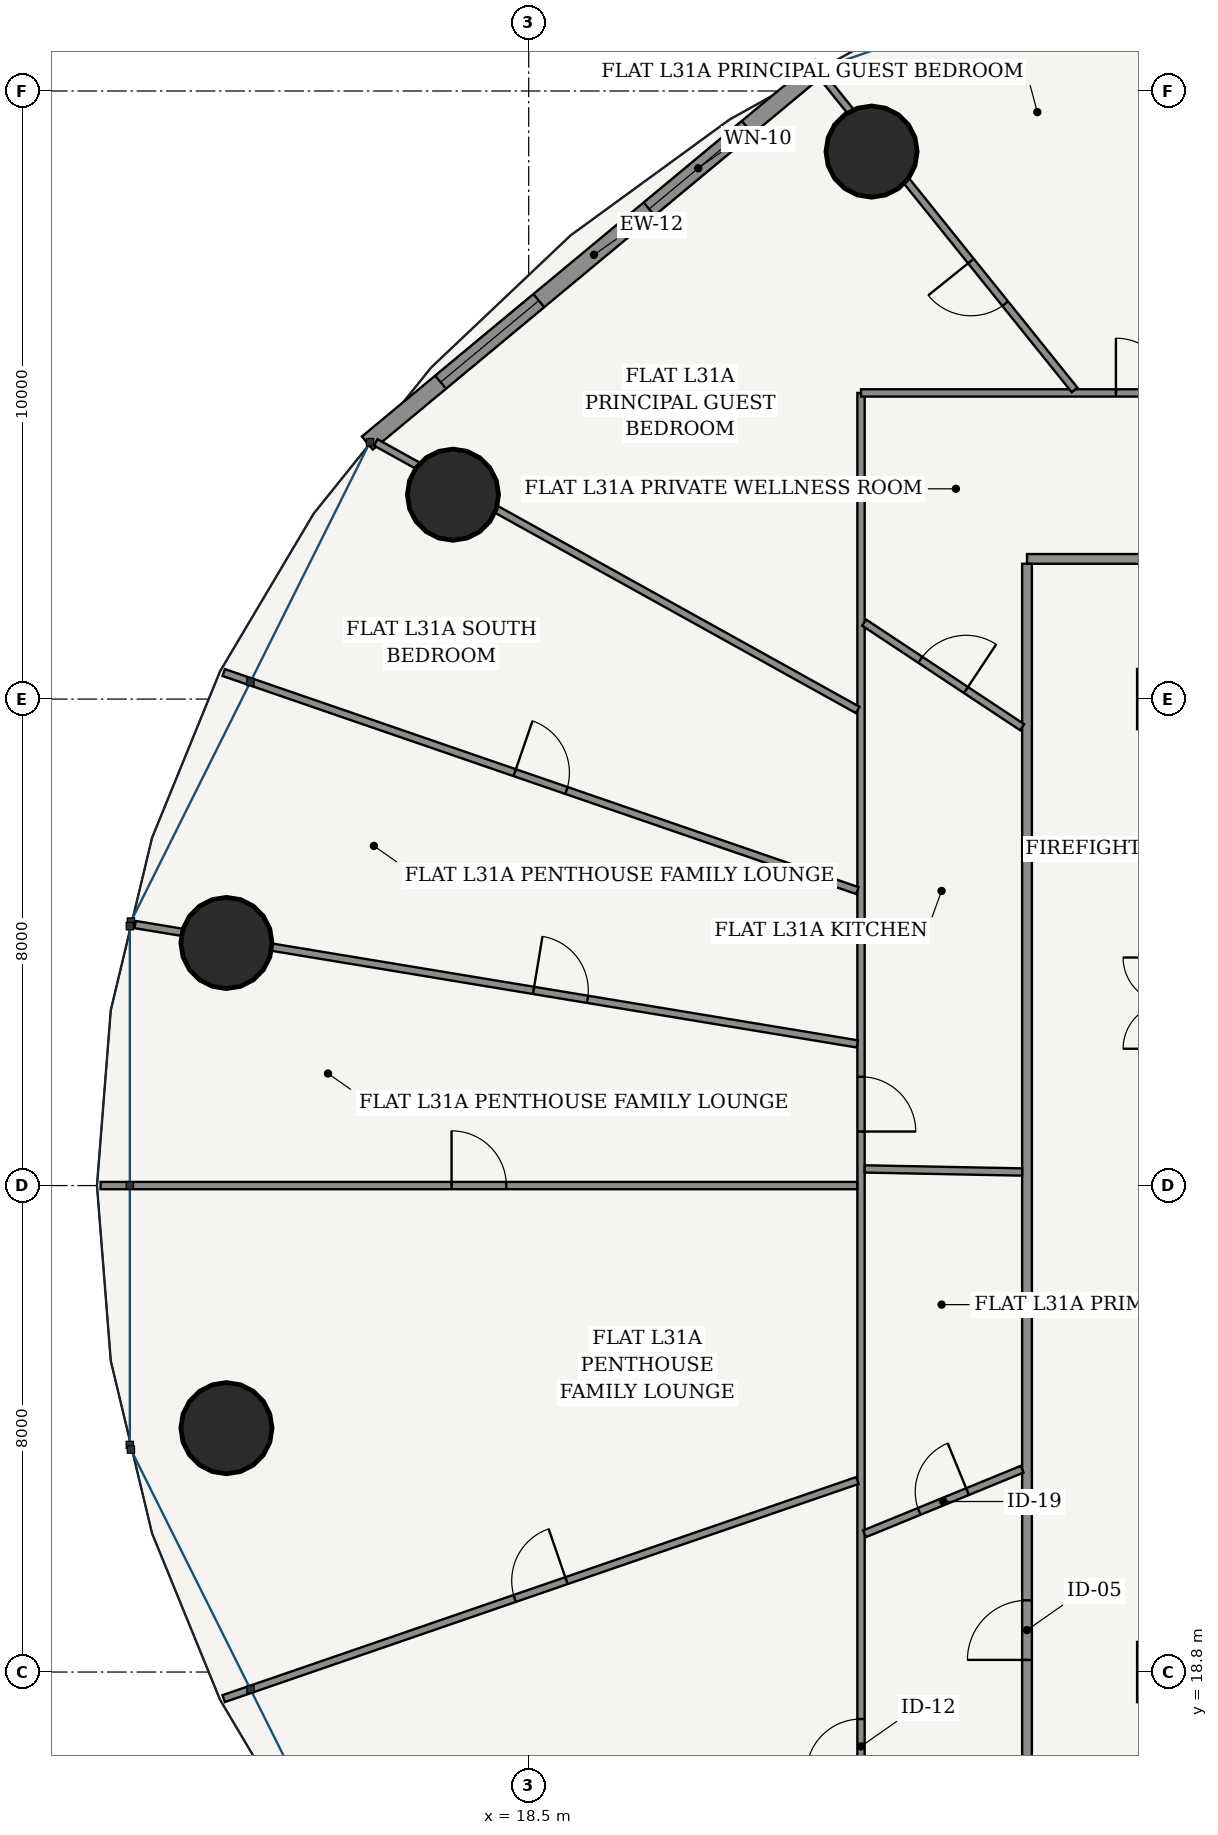
"""IFC4 building model, lengths in metres.
Left out: names, types, materials, properties, quantities, classifications, styles, units other than length and angle.
Written with IfcOpenShell. Run it as: python <this file> out.ifc"""

import sys

from ifc_helpers import new_model, si_unit, direction, frame, frame_2d, origin, origin_2d, place, context, subcontext, project, spatial, rectangle, hollow_circle, extrude, source, transform, mapped, element, fill, save


model = new_model("IFC4")
c1 = context("Model", 3, precision=1e-05, world=origin(), true_north=direction((-0.2419218956, 0.970295726276)))
c2 = subcontext(c1, "Body", "Model", "MODEL_VIEW")
j1 = project(units=[si_unit("LENGTHUNIT", "METRE"), si_unit("PLANEANGLEUNIT", "RADIAN")], contexts=[c1])
p1 = place(None, origin())
s1 = spatial("IfcSite", under=j1, at=p1, CompositionType="ELEMENT")
p2 = place(p1, origin())
s2 = spatial("IfcBuilding", under=s1, at=p2, CompositionType="ELEMENT")
p3 = place(p2, frame((0.0, 0.0, 119.4)))
s3 = spatial("IfcBuildingStorey", under=s2, at=p3, CompositionType="ELEMENT", Elevation=119.4)
for number, where, z_axis, x_axis in (
    (1, (24.138, 43.803, 0.0), (0.0, 0.0, 1.0), (1.0, 0.0, 0.0)),
    (2, (17.255, 38.161, 0.0), (0.0, 0.0, 1.0), (1.0, 0.0, 0.0)),
    (3, (13.529, 30.79, 0.0), (0.0, 0.0, 1.0), (1.0, 0.0, 0.0)),
    (4, (13.529, 22.81, 0.0), (0.0, 0.0, 1.0), (1.0, 0.0, 0.0)),
):
    element("IfcColumn", number, at=place(p3, frame(where, z_axis=z_axis, x_axis=x_axis)), inside=s3, PredefinedType="COLUMN", context=c2, shape_type="SweptSolid", body=[
        extrude(hollow_circle(Radius=0.75, WallThickness=0.045, at=origin_2d()), origin(), (0.0, 0.0, 1.0), 3.6),
    ])
p4 = place(p3, frame((23.3, 45.202, 0.0), z_axis=(0.0, 0.0, 1.0), x_axis=(-0.769242574941, -0.638956853706, 0.0)))
e5 = element("IfcWall", 5, at=p4, inside=s3, PredefinedType="SOLIDWALL", context=c2, shape_type="SweptSolid", body=[
    extrude(rectangle(XDim=9.69, YDim=0.28, at=frame_2d((4.845, 0.0))), origin(), (0.0, 0.0, 1.0), 3.325),
])
p5 = place(p4, frame((1.566, 0.0, 0.85)))
e6 = element("IfcOpeningElement", 6, at=p5, cuts=e5, PredefinedType="OPENING", context=c2, shape_type="SweptSolid", body=[
    extrude(rectangle(XDim=2.1, YDim=1.95, at=frame_2d((1.05, 0.975))), frame((0.0, 0.15, 0.0), z_axis=(0.0, -1.0, 0.0), x_axis=(1.0, 0.0, 0.0)), (0.0, 0.0, 1.0), 0.3),
])
p6 = place(p4, frame((6.023, 0.0, 0.85)))
e7 = element("IfcOpeningElement", 7, at=p6, cuts=e5, PredefinedType="OPENING", context=c2, shape_type="SweptSolid", body=[
    extrude(rectangle(XDim=2.1, YDim=1.95, at=frame_2d((1.05, 0.975))), frame((0.0, 0.15, 0.0), z_axis=(0.0, -1.0, 0.0), x_axis=(1.0, 0.0, 0.0)), (0.0, 0.0, 1.0), 0.3),
])
p7 = place(p3, frame((26.695, 37.105, 0.0), z_axis=(0.0, 0.0, 1.0), x_axis=(1.0, 0.0, 0.0)))
e8 = element("IfcWall", 8, at=p7, inside=s3, PredefinedType="PARTITIONING", context=c2, shape_type="SweptSolid", body=[
    extrude(rectangle(XDim=22.61, YDim=0.16, at=frame_2d((11.305, 0.0))), origin(), (0.0, 0.0, 1.0), 2.767),
])
p8 = place(p3, frame((26.695, 16.575, 0.0), z_axis=(0.0, 0.0, 1.0), x_axis=(0.0, 1.0, 0.0)))
e9 = element("IfcWall", 9, at=p8, inside=s3, PredefinedType="PARTITIONING", context=c2, shape_type="SweptSolid", body=[
    extrude(rectangle(XDim=20.45, YDim=0.16, at=frame_2d((10.225, 0.0))), origin(), (0.0, 0.0, 1.0), 2.767),
])
p9 = place(p8, frame((2.424, 0.0, 0.0)))
e10 = element("IfcOpeningElement", 10, at=p9, cuts=e9, PredefinedType="OPENING", context=c2, shape_type="SweptSolid", body=[
    extrude(rectangle(XDim=0.98, YDim=2.2, at=frame_2d((0.49, 1.1))), frame((0.0, 0.09, 0.0), z_axis=(0.0, -1.0, 0.0), x_axis=(1.0, 0.0, 0.0)), (0.0, 0.0, 1.0), 0.18),
])
p10 = place(p3, frame((23.965, 13.765, 0.0), z_axis=(0.0, 0.0, 1.0), x_axis=(0.0, 1.0, 0.0)))
e11 = element("IfcWall", 11, at=p10, inside=s3, PredefinedType="PARTITIONING", context=c2, shape_type="SweptSolid", body=[
    extrude(rectangle(XDim=26.07, YDim=0.12, at=frame_2d((13.035, 0.0))), origin(), (0.0, 0.0, 1.0), 2.767),
])
p11 = place(p10, frame((3.362, 0.0, 0.0)))
e12 = element("IfcOpeningElement", 12, at=p11, cuts=e11, PredefinedType="OPENING", context=c2, shape_type="SweptSolid", body=[
    extrude(rectangle(XDim=0.9, YDim=2.15, at=frame_2d((0.45, 1.075))), frame((0.0, 0.07, 0.0), z_axis=(0.0, -1.0, 0.0), x_axis=(1.0, 0.0, 0.0)), (0.0, 0.0, 1.0), 0.14),
])
p12 = place(p10, frame((13.924, 0.0, 0.0)))
e13 = element("IfcOpeningElement", 13, at=p12, cuts=e11, PredefinedType="OPENING", context=c2, shape_type="SweptSolid", body=[
    extrude(rectangle(XDim=0.9, YDim=2.15, at=frame_2d((0.45, 1.075))), frame((0.0, 0.07, 0.0), z_axis=(0.0, -1.0, 0.0), x_axis=(1.0, 0.0, 0.0)), (0.0, 0.0, 1.0), 0.14),
])
p13 = place(p3, frame((23.965, 39.835, 0.0), z_axis=(0.0, 0.0, 1.0), x_axis=(1.0, 0.0, 0.0)))
e14 = element("IfcWall", 14, at=p13, inside=s3, PredefinedType="PARTITIONING", context=c2, shape_type="SweptSolid", body=[
    extrude(rectangle(XDim=24.416, YDim=0.12, at=frame_2d((12.208, 0.0))), origin(), (0.0, 0.0, 1.0), 2.767),
])
p14 = place(p13, frame((4.192, 0.0, 0.0)))
e15 = element("IfcOpeningElement", 15, at=p14, cuts=e14, PredefinedType="OPENING", context=c2, shape_type="SweptSolid", body=[
    extrude(rectangle(XDim=0.9, YDim=2.15, at=frame_2d((0.45, 1.075))), frame((0.0, 0.07, 0.0), z_axis=(0.0, -1.0, 0.0), x_axis=(1.0, 0.0, 0.0)), (0.0, 0.0, 1.0), 0.14),
])
p15 = place(p13, frame((19.728, 0.0, 0.0)))
e16 = element("IfcOpeningElement", 16, at=p15, cuts=e14, PredefinedType="OPENING", context=c2, shape_type="SweptSolid", body=[
    extrude(rectangle(XDim=0.86, YDim=2.15, at=frame_2d((0.43, 1.075))), frame((0.0, 0.07, 0.0), z_axis=(0.0, -1.0, 0.0), x_axis=(1.0, 0.0, 0.0)), (0.0, 0.0, 1.0), 0.14),
])
p16 = place(p3, frame((31.474, 39.89, 0.0), z_axis=(0.0, 0.0, 1.0), x_axis=(-0.446167584581, 0.894949432353, 0.0)))
e17 = element("IfcWall", 17, at=p16, inside=s3, PredefinedType="PARTITIONING", context=c2, shape_type="SweptSolid", body=[
    extrude(rectangle(XDim=8.125, YDim=0.12, at=frame_2d((4.062, 0.0))), origin(), (0.0, 0.0, 1.0), 2.767),
])
p17 = place(p16, frame((3.612, 0.0, 0.0)))
e18 = element("IfcOpeningElement", 18, at=p17, cuts=e17, PredefinedType="OPENING", context=c2, shape_type="SweptSolid", body=[
    extrude(rectangle(XDim=0.9, YDim=2.15, at=frame_2d((0.45, 1.075))), frame((0.0, 0.07, 0.0), z_axis=(0.0, -1.0, 0.0), x_axis=(1.0, 0.0, 0.0)), (0.0, 0.0, 1.0), 0.14),
])
p18 = place(p3, frame((27.478, 39.883, 0.0), z_axis=(0.0, 0.0, 1.0), x_axis=(-0.62672583251, 0.779239841682, 0.0)))
e19 = element("IfcWall", 19, at=p18, inside=s3, PredefinedType="PARTITIONING", context=c2, shape_type="SweptSolid", body=[
    extrude(rectangle(XDim=6.678, YDim=0.12, at=frame_2d((3.339, 0.0))), origin(), (0.0, 0.0, 1.0), 2.767),
])
p19 = place(p18, frame((1.821, 0.0, 0.0)))
e20 = element("IfcOpeningElement", 20, at=p19, cuts=e19, PredefinedType="OPENING", context=c2, shape_type="SweptSolid", body=[
    extrude(rectangle(XDim=0.9, YDim=2.15, at=frame_2d((0.45, 1.075))), frame((0.0, 0.07, 0.0), z_axis=(0.0, -1.0, 0.0), x_axis=(1.0, 0.0, 0.0)), (0.0, 0.0, 1.0), 0.14),
])
p20 = place(p3, frame((23.911, 34.622, 0.0), z_axis=(0.0, 0.0, 1.0), x_axis=(-0.874324904351, 0.485341077626, 0.0)))
e21 = element("IfcWall", 21, at=p20, inside=s3, PredefinedType="PARTITIONING", context=c2, shape_type="SweptSolid", body=[
    extrude(rectangle(XDim=9.066, YDim=0.12, at=frame_2d((4.533, 0.0))), origin(), (0.0, 0.0, 1.0), 2.767),
])
p21 = place(p3, frame((23.906, 31.65, 0.0), z_axis=(0.0, 0.0, 1.0), x_axis=(-0.945573120726, 0.32540970078, 0.0)))
e22 = element("IfcWall", 22, at=p21, inside=s3, PredefinedType="PARTITIONING", context=c2, shape_type="SweptSolid", body=[
    extrude(rectangle(XDim=11.022, YDim=0.12, at=frame_2d((5.511, 0.0))), origin(), (0.0, 0.0, 1.0), 2.767),
])
p22 = place(p21, frame((5.061, 0.0, 0.0)))
e23 = element("IfcOpeningElement", 23, at=p22, cuts=e22, PredefinedType="OPENING", context=c2, shape_type="SweptSolid", body=[
    extrude(rectangle(XDim=0.9, YDim=2.15, at=frame_2d((0.45, 1.075))), frame((0.0, 0.07, 0.0), z_axis=(0.0, -1.0, 0.0), x_axis=(1.0, 0.0, 0.0)), (0.0, 0.0, 1.0), 0.14),
])
p23 = place(p3, frame((23.904, 29.13, 0.0), z_axis=(0.0, 0.0, 1.0), x_axis=(-0.986618264768, 0.163047231274, 0.0)))
e24 = element("IfcWall", 24, at=p23, inside=s3, PredefinedType="PARTITIONING", context=c2, shape_type="SweptSolid", body=[
    extrude(rectangle(XDim=12.039, YDim=0.12, at=frame_2d((6.02, 0.0))), origin(), (0.0, 0.0, 1.0), 2.767),
])
p24 = place(p23, frame((4.496, 0.0, 0.0)))
e25 = element("IfcOpeningElement", 25, at=p24, cuts=e24, PredefinedType="OPENING", context=c2, shape_type="SweptSolid", body=[
    extrude(rectangle(XDim=0.9, YDim=2.15, at=frame_2d((0.45, 1.075))), frame((0.0, 0.07, 0.0), z_axis=(0.0, -1.0, 0.0), x_axis=(1.0, 0.0, 0.0)), (0.0, 0.0, 1.0), 0.14),
])
p25 = place(p3, frame((23.903, 26.8, 0.0), z_axis=(0.0, 0.0, 1.0), x_axis=(-1.0, 0.0, 0.0)))
e26 = element("IfcWall", 26, at=p25, inside=s3, PredefinedType="PARTITIONING", context=c2, shape_type="SweptSolid", body=[
    extrude(rectangle(XDim=12.443, YDim=0.12, at=frame_2d((6.222, 0.0))), origin(), (0.0, 0.0, 1.0), 2.767),
])
p26 = place(p25, frame((5.771, 0.0, 0.0)))
e27 = element("IfcOpeningElement", 27, at=p26, cuts=e26, PredefinedType="OPENING", context=c2, shape_type="SweptSolid", body=[
    extrude(rectangle(XDim=0.9, YDim=2.15, at=frame_2d((0.45, 1.075))), frame((0.0, 0.07, 0.0), z_axis=(0.0, -1.0, 0.0), x_axis=(1.0, 0.0, 0.0)), (0.0, 0.0, 1.0), 0.14),
])
p27 = place(p3, frame((23.906, 21.95, 0.0), z_axis=(0.0, 0.0, 1.0), x_axis=(-0.945573120726, -0.32540970078, 0.0)))
e28 = element("IfcWall", 28, at=p27, inside=s3, PredefinedType="PARTITIONING", context=c2, shape_type="SweptSolid", body=[
    extrude(rectangle(XDim=11.022, YDim=0.12, at=frame_2d((5.511, 0.0))), origin(), (0.0, 0.0, 1.0), 2.767),
])
p28 = place(p27, frame((5.061, 0.0, 0.0)))
e29 = element("IfcOpeningElement", 29, at=p28, cuts=e28, PredefinedType="OPENING", context=c2, shape_type="SweptSolid", body=[
    extrude(rectangle(XDim=0.9, YDim=2.15, at=frame_2d((0.45, 1.075))), frame((0.0, 0.07, 0.0), z_axis=(0.0, -1.0, 0.0), x_axis=(1.0, 0.0, 0.0)), (0.0, 0.0, 1.0), 0.14),
])
p29 = place(p3, frame((26.615, 34.337, 0.0), z_axis=(0.0, 0.0, 1.0), x_axis=(-0.833829855758, 0.552021531868, 0.0)))
e30 = element("IfcWall", 30, at=p29, inside=s3, PredefinedType="PARTITIONING", context=c2, shape_type="SweptSolid", body=[
    extrude(rectangle(XDim=3.116, YDim=0.12, at=frame_2d((1.558, 0.0))), origin(), (0.0, 0.0, 1.0), 3.325),
])
p30 = place(p29, frame((1.108, 0.0, 0.0)))
e31 = element("IfcOpeningElement", 31, at=p30, cuts=e30, PredefinedType="OPENING", context=c2, shape_type="SweptSolid", body=[
    extrude(rectangle(XDim=0.9, YDim=2.15, at=frame_2d((0.45, 1.075))), frame((0.0, 0.07, 0.0), z_axis=(0.0, -1.0, 0.0), x_axis=(1.0, 0.0, 0.0)), (0.0, 0.0, 1.0), 0.14),
])
p31 = place(p3, frame((26.615, 27.023, 0.0), z_axis=(0.0, 0.0, 1.0), x_axis=(-0.999809377232, 0.019524579348, 0.0)))
e32 = element("IfcWall", 32, at=p31, inside=s3, PredefinedType="PARTITIONING", context=c2, shape_type="SweptSolid", body=[
    extrude(rectangle(XDim=2.588, YDim=0.12, at=frame_2d((1.294, 0.0))), origin(), (0.0, 0.0, 1.0), 3.325),
])
p32 = place(p3, frame((26.615, 22.135, 0.0), z_axis=(0.0, 0.0, 1.0), x_axis=(-0.925337216259, -0.379145138708, 0.0)))
e33 = element("IfcWall", 33, at=p32, inside=s3, PredefinedType="PARTITIONING", context=c2, shape_type="SweptSolid", body=[
    extrude(rectangle(XDim=2.802, YDim=0.12, at=frame_2d((1.401, 0.0))), origin(), (0.0, 0.0, 1.0), 3.325),
])
p33 = place(p32, frame((0.971, 0.0, 0.0)))
e34 = element("IfcOpeningElement", 34, at=p33, cuts=e33, PredefinedType="OPENING", context=c2, shape_type="SweptSolid", body=[
    extrude(rectangle(XDim=0.86, YDim=2.15, at=frame_2d((0.43, 1.075))), frame((0.0, 0.07, 0.0), z_axis=(0.0, -1.0, 0.0), x_axis=(1.0, 0.0, 0.0)), (0.0, 0.0, 1.0), 0.14),
])
m1 = source(origin(), c2, "Body", "SweptSolid", [
    extrude(rectangle(XDim=2.1, YDim=1.95, at=frame_2d((1.05, 0.975))), frame((0.0, 0.03, 0.0), z_axis=(0.0, -1.0, 0.0), x_axis=(1.0, 0.0, 0.0)), (0.0, 0.0, 1.0), 0.06),
])
p34 = place(p5, origin())
e35 = element("IfcWindow", 35, at=p34, inside=s3, PartitioningType="SINGLE_PANEL", PredefinedType="WINDOW", context=c2, shape_type="MappedRepresentation", body=[
    mapped(m1, transform((0.0, 0.0, 0.0), scale=1.0)),
])
fill(e6, e35)
p35 = place(p6, origin())
e36 = element("IfcWindow", 36, at=p35, inside=s3, PartitioningType="SINGLE_PANEL", PredefinedType="WINDOW", context=c2, shape_type="MappedRepresentation", body=[
    mapped(m1, transform((0.0, 0.0, 0.0), scale=1.0)),
])
fill(e7, e36)
m2 = source(origin(), c2, "Body", "SweptSolid", [
    extrude(rectangle(XDim=0.98, YDim=2.2, at=frame_2d((0.49, 1.1))), frame((0.0, 0.025, 0.0), z_axis=(0.0, -1.0, 0.0), x_axis=(1.0, 0.0, 0.0)), (0.0, 0.0, 1.0), 0.05),
])
p36 = place(p9, origin())
e37 = element("IfcDoor", 37, at=p36, inside=s3, OperationType="SINGLE_SWING_LEFT", PredefinedType="DOOR", context=c2, shape_type="MappedRepresentation", body=[
    mapped(m2, transform((0.0, 0.0, 0.0), scale=1.0)),
])
fill(e10, e37)
m3 = source(origin(), c2, "Body", "SweptSolid", [
    extrude(rectangle(XDim=0.86, YDim=2.15, at=frame_2d((0.43, 1.075))), frame((0.0, 0.025, 0.0), z_axis=(0.0, -1.0, 0.0), x_axis=(1.0, 0.0, 0.0)), (0.0, 0.0, 1.0), 0.05),
])
p37 = place(p33, frame((0.86, 0.0, 0.0), z_axis=(0.0, 0.0, 1.0), x_axis=(-1.0, 0.0, 0.0)))
e38 = element("IfcDoor", 38, at=p37, inside=s3, OperationType="SINGLE_SWING_RIGHT", PredefinedType="DOOR", context=c2, shape_type="MappedRepresentation", body=[
    mapped(m3, transform((0.0, 0.0, 0.0), scale=1.0)),
])
fill(e34, e38)
m4 = source(origin(), c2, "Body", "SweptSolid", [
    extrude(rectangle(XDim=0.9, YDim=2.15, at=frame_2d((0.45, 1.075))), frame((0.0, 0.025, 0.0), z_axis=(0.0, -1.0, 0.0), x_axis=(1.0, 0.0, 0.0)), (0.0, 0.0, 1.0), 0.05),
])
p38 = place(p11, origin())
e39 = element("IfcDoor", 39, at=p38, inside=s3, OperationType="SINGLE_SWING_LEFT", PredefinedType="DOOR", context=c2, shape_type="MappedRepresentation", body=[
    mapped(m4, transform((0.0, 0.0, 0.0), scale=1.0)),
])
fill(e12, e39)
p39 = place(p28, frame((0.9, 0.0, 0.0), z_axis=(0.0, 0.0, 1.0), x_axis=(-1.0, 0.0, 0.0)))
e40 = element("IfcDoor", 40, at=p39, inside=s3, OperationType="SINGLE_SWING_RIGHT", PredefinedType="DOOR", context=c2, shape_type="MappedRepresentation", body=[
    mapped(m4, transform((0.0, 0.0, 0.0), scale=1.0)),
])
fill(e29, e40)
p40 = place(p26, frame((0.9, 0.0, 0.0), z_axis=(0.0, 0.0, 1.0), x_axis=(-1.0, 0.0, 0.0)))
e41 = element("IfcDoor", 41, at=p40, inside=s3, OperationType="SINGLE_SWING_LEFT", PredefinedType="DOOR", context=c2, shape_type="MappedRepresentation", body=[
    mapped(m4, transform((0.0, 0.0, 0.0), scale=1.0)),
])
fill(e27, e41)
p41 = place(p12, frame((0.9, 0.0, 0.0), z_axis=(0.0, 0.0, 1.0), x_axis=(-1.0, 0.0, 0.0)))
e42 = element("IfcDoor", 42, at=p41, inside=s3, OperationType="SINGLE_SWING_RIGHT", PredefinedType="DOOR", context=c2, shape_type="MappedRepresentation", body=[
    mapped(m4, transform((0.0, 0.0, 0.0), scale=1.0)),
])
fill(e13, e42)
p42 = place(p24, frame((0.9, 0.0, 0.0), z_axis=(0.0, 0.0, 1.0), x_axis=(-1.0, 0.0, 0.0)))
e43 = element("IfcDoor", 43, at=p42, inside=s3, OperationType="SINGLE_SWING_LEFT", PredefinedType="DOOR", context=c2, shape_type="MappedRepresentation", body=[
    mapped(m4, transform((0.0, 0.0, 0.0), scale=1.0)),
])
fill(e25, e43)
p43 = place(p30, frame((0.9, 0.0, 0.0), z_axis=(0.0, 0.0, 1.0), x_axis=(-1.0, 0.0, 0.0)))
e44 = element("IfcDoor", 44, at=p43, inside=s3, OperationType="SINGLE_SWING_RIGHT", PredefinedType="DOOR", context=c2, shape_type="MappedRepresentation", body=[
    mapped(m4, transform((0.0, 0.0, 0.0), scale=1.0)),
])
fill(e31, e44)
p44 = place(p14, origin())
e45 = element("IfcDoor", 45, at=p44, inside=s3, OperationType="SINGLE_SWING_LEFT", PredefinedType="DOOR", context=c2, shape_type="MappedRepresentation", body=[
    mapped(m4, transform((0.0, 0.0, 0.0), scale=1.0)),
])
fill(e15, e45)
p45 = place(p19, origin())
e46 = element("IfcDoor", 46, at=p45, inside=s3, OperationType="SINGLE_SWING_RIGHT", PredefinedType="DOOR", context=c2, shape_type="MappedRepresentation", body=[
    mapped(m4, transform((0.0, 0.0, 0.0), scale=1.0)),
])
fill(e20, e46)
p46 = place(p22, frame((0.9, 0.0, 0.0), z_axis=(0.0, 0.0, 1.0), x_axis=(-1.0, 0.0, 0.0)))
e47 = element("IfcDoor", 47, at=p46, inside=s3, OperationType="SINGLE_SWING_LEFT", PredefinedType="DOOR", context=c2, shape_type="MappedRepresentation", body=[
    mapped(m4, transform((0.0, 0.0, 0.0), scale=1.0)),
])
fill(e23, e47)
save(model, sys.argv[1])
